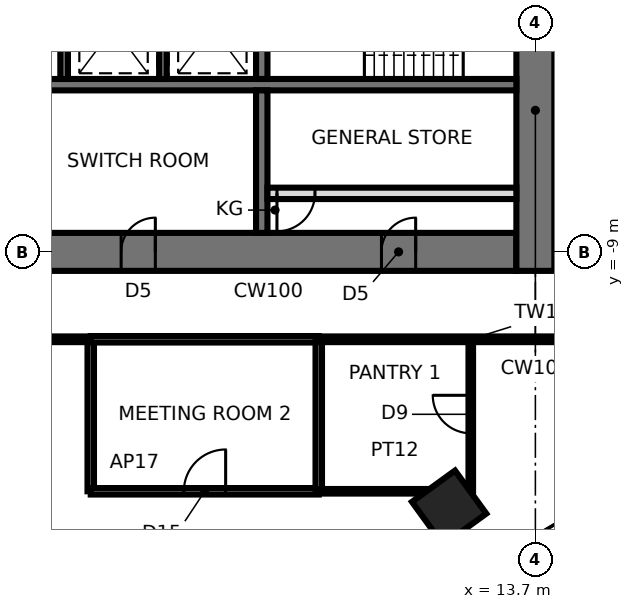
"""IFC4 building model, lengths in metres.
Left out: names, types, materials, properties, quantities, classifications, styles, units other than length and angle.
Written with IfcOpenShell. Run it as: python <this file> out.ifc"""

import sys

from ifc_helpers import new_model, si_unit, direction, frame, frame_2d, origin, origin_2d, place, context, subcontext, project, spatial, rectangle, extrude, element, fill, save


model = new_model("IFC4")
c1 = context("Model", 3, precision=1e-05, world=origin(), true_north=direction((0.0, 1.0)))
c2 = subcontext(c1, "Body", "Model", "MODEL_VIEW")
j1 = project(units=[si_unit("LENGTHUNIT", "METRE"), si_unit("PLANEANGLEUNIT", "RADIAN")], contexts=[c1])
p1 = place(None, origin())
s1 = spatial("IfcSite", under=j1, at=p1, CompositionType="ELEMENT")
p2 = place(p1, origin())
s2 = spatial("IfcBuilding", under=s1, at=p2, CompositionType="ELEMENT")
p3 = place(p2, frame((0.0, 0.0, 176.0)))
s3 = spatial("IfcBuildingStorey", under=s2, at=p3, CompositionType="ELEMENT", Elevation=176.0)
p4 = place(p3, frame((11.43, -15.733, 0.0), z_axis=(0.0, 0.0, 1.0), x_axis=(0.587785252292, -0.809016994375, 0.0)))
e1 = element("IfcColumn", 1, at=p4, inside=s3, PredefinedType="COLUMN", context=c2, shape_type="SweptSolid", body=[
    extrude(rectangle(XDim=1.4, YDim=1.4, at=origin_2d()), origin(), (0.0, 0.0, 1.0), 3.9),
])
p5 = place(p3, frame((-13.2, -9.0, 0.0), z_axis=(0.0, 0.0, 1.0), x_axis=(1.0, 0.0, 0.0)))
e2 = element("IfcWall", 2, at=p5, inside=s3, PredefinedType="SHEAR", context=c2, shape_type="SweptSolid", body=[
    extrude(rectangle(XDim=26.4, YDim=1.0, at=frame_2d((13.2, 0.0))), origin(), (0.0, 0.0, 1.0), 3.9),
])
p6 = place(p5, frame((2.65, 0.0, 0.0)))
e3 = element("IfcOpeningElement", 3, at=p6, cuts=e2, PredefinedType="OPENING", context=c2, shape_type="SweptSolid", body=[
    extrude(rectangle(XDim=0.9, YDim=2.1, at=frame_2d((0.45, 1.05))), frame((0.0, 0.51, 0.0), z_axis=(0.0, -1.0, 0.0), x_axis=(1.0, 0.0, 0.0)), (0.0, 0.0, 1.0), 1.02),
])
p7 = place(p5, frame((9.5, 0.0, 0.0)))
e4 = element("IfcOpeningElement", 4, at=p7, cuts=e2, PredefinedType="OPENING", context=c2, shape_type="SweptSolid", body=[
    extrude(rectangle(XDim=0.9, YDim=2.1, at=frame_2d((0.45, 1.05))), frame((0.0, 0.51, 0.0), z_axis=(0.0, -1.0, 0.0), x_axis=(1.0, 0.0, 0.0)), (0.0, 0.0, 1.0), 1.02),
])
p8 = place(p5, frame((16.0, 0.0, 0.0)))
e5 = element("IfcOpeningElement", 5, at=p8, cuts=e2, PredefinedType="OPENING", context=c2, shape_type="SweptSolid", body=[
    extrude(rectangle(XDim=0.9, YDim=2.1, at=frame_2d((0.45, 1.05))), frame((0.0, 0.51, 0.0), z_axis=(0.0, -1.0, 0.0), x_axis=(1.0, 0.0, 0.0)), (0.0, 0.0, 1.0), 1.02),
])
p9 = place(p5, frame((22.85, 0.0, 0.0)))
e6 = element("IfcOpeningElement", 6, at=p9, cuts=e2, PredefinedType="OPENING", context=c2, shape_type="SweptSolid", body=[
    extrude(rectangle(XDim=0.9, YDim=2.1, at=frame_2d((0.45, 1.05))), frame((0.0, 0.51, 0.0), z_axis=(0.0, -1.0, 0.0), x_axis=(1.0, 0.0, 0.0)), (0.0, 0.0, 1.0), 1.02),
])
p10 = place(p3, frame((13.7, -9.5, 0.0), z_axis=(0.0, 0.0, 1.0), x_axis=(0.0, 1.0, 0.0)))
e7 = element("IfcWall", 7, at=p10, inside=s3, PredefinedType="SHEAR", context=c2, shape_type="SweptSolid", body=[
    extrude(rectangle(XDim=19.0, YDim=1.0, at=frame_2d((9.5, 0.0))), origin(), (0.0, 0.0, 1.0), 3.9),
])
p11 = place(p10, frame((8.6, 0.0, 0.0)))
e8 = element("IfcOpeningElement", 8, at=p11, cuts=e7, PredefinedType="OPENING", context=c2, shape_type="SweptSolid", body=[
    extrude(rectangle(XDim=1.8, YDim=2.4, at=frame_2d((0.9, 1.2))), frame((0.0, 0.51, 0.0), z_axis=(0.0, -1.0, 0.0), x_axis=(1.0, 0.0, 0.0)), (0.0, 0.0, 1.0), 1.02),
])
p12 = place(p3, frame((-13.2, -4.6, 0.0), z_axis=(0.0, 0.0, 1.0), x_axis=(1.0, 0.0, 0.0)))
e9 = element("IfcWall", 9, at=p12, inside=s3, PredefinedType="SHEAR", context=c2, shape_type="SweptSolid", body=[
    extrude(rectangle(XDim=26.4, YDim=0.3, at=frame_2d((13.2, 0.0))), origin(), (0.0, 0.0, 1.0), 3.9),
])
p13 = place(p3, frame((6.5, -1.75, 0.0), z_axis=(0.0, 0.0, 1.0), x_axis=(0.0, -1.0, 0.0)))
e10 = element("IfcWall", 10, at=p13, inside=s3, PredefinedType="SHEAR", context=c2, shape_type="SweptSolid", body=[
    extrude(rectangle(XDim=2.7, YDim=0.3, at=frame_2d((1.35, 0.0))), origin(), (0.0, 0.0, 1.0), 3.9),
])
p14 = place(p3, frame((6.5, -4.75, 0.0), z_axis=(0.0, 0.0, 1.0), x_axis=(0.0, -1.0, 0.0)))
e11 = element("IfcWall", 11, at=p14, inside=s3, PredefinedType="SHEAR", context=c2, shape_type="SweptSolid", body=[
    extrude(rectangle(XDim=3.75, YDim=0.3, at=frame_2d((1.875, 0.0))), origin(), (0.0, 0.0, 1.0), 3.9),
])
for number, where, z_axis, x_axis in (
    (12, (1.3, -1.75, 0.0), (0.0, 0.0, 1.0), (0.0, -1.0, 0.0)),
    (13, (3.9, -1.75, 0.0), (0.0, 0.0, 1.0), (0.0, -1.0, 0.0)),
):
    element("IfcWall", number, at=place(p3, frame(where, z_axis=z_axis, x_axis=x_axis)), inside=s3, PredefinedType="SHEAR", context=c2, shape_type="SweptSolid", body=[
        extrude(rectangle(XDim=2.7, YDim=0.2, at=frame_2d((1.35, 0.0))), origin(), (0.0, 0.0, 1.0), 3.9),
    ])
p15 = place(p3, frame((6.65, -7.46, 0.0), z_axis=(0.0, 0.0, 1.0), x_axis=(1.0, 0.0, 0.0)))
e14 = element("IfcWall", 14, at=p15, inside=s3, PredefinedType="PARTITIONING", context=c2, shape_type="SweptSolid", body=[
    extrude(rectangle(XDim=6.55, YDim=0.3, at=frame_2d((3.275, 0.0))), origin(), (0.0, 0.0, 1.0), 3.74),
])
p16 = place(p15, frame((0.25, 0.0, 0.0)))
e15 = element("IfcOpeningElement", 15, at=p16, cuts=e14, PredefinedType="OPENING", context=c2, shape_type="SweptSolid", body=[
    extrude(rectangle(XDim=1.0, YDim=2.4, at=frame_2d((0.5, 1.2))), frame((0.0, 0.16, 0.0), z_axis=(0.0, -1.0, 0.0), x_axis=(1.0, 0.0, 0.0)), (0.0, 0.0, 1.0), 0.32),
])
p17 = place(p3, frame((-16.0, -11.3, 0.0), z_axis=(0.0, 0.0, 1.0), x_axis=(1.0, 0.0, 0.0)))
e16 = element("IfcWall", 16, at=p17, inside=s3, PredefinedType="PARTITIONING", context=c2, shape_type="SweptSolid", body=[
    extrude(rectangle(XDim=18.0, YDim=0.15, at=frame_2d((9.0, 0.0))), origin(), (0.0, 0.0, 1.0), 3.74),
])
p18 = place(p17, frame((4.113, 0.0, 0.0)))
e17 = element("IfcOpeningElement", 17, at=p18, cuts=e16, PredefinedType="OPENING", context=c2, shape_type="SweptSolid", body=[
    extrude(rectangle(XDim=1.2, YDim=2.4, at=frame_2d((0.6, 1.2))), frame((0.0, 0.085, 0.0), z_axis=(0.0, -1.0, 0.0), x_axis=(1.0, 0.0, 0.0)), (0.0, 0.0, 1.0), 0.17),
])
p19 = place(p3, frame((2.0, -11.3, 0.0), z_axis=(0.0, 0.0, 1.0), x_axis=(0.0, -1.0, 0.0)))
e18 = element("IfcWall", 18, at=p19, inside=s3, PredefinedType="PARTITIONING", context=c2, shape_type="SweptSolid", body=[
    extrude(rectangle(XDim=4.0, YDim=0.17, at=frame_2d((2.0, 0.0))), origin(), (0.0, 0.0, 1.0), 3.74),
])
p20 = place(p3, frame((2.0, -15.3, 0.0), z_axis=(0.0, 0.0, 1.0), x_axis=(1.0, 0.0, 0.0)))
e19 = element("IfcWall", 19, at=p20, inside=s3, PredefinedType="PARTITIONING", context=c2, shape_type="SweptSolid", body=[
    extrude(rectangle(XDim=6.0, YDim=0.17, at=frame_2d((3.0, 0.0))), origin(), (0.0, 0.0, 1.0), 3.334),
])
p21 = place(p20, frame((2.45, 0.0, 0.0)))
e20 = element("IfcOpeningElement", 20, at=p21, cuts=e19, PredefinedType="OPENING", context=c2, shape_type="SweptSolid", body=[
    extrude(rectangle(XDim=1.1, YDim=2.4, at=frame_2d((0.55, 1.2))), frame((0.0, 0.095, 0.0), z_axis=(0.0, -1.0, 0.0), x_axis=(1.0, 0.0, 0.0)), (0.0, 0.0, 1.0), 0.19),
])
p22 = place(p3, frame((8.0, -11.3, 0.0), z_axis=(0.0, 0.0, 1.0), x_axis=(-1.0, 0.0, 0.0)))
e21 = element("IfcWall", 21, at=p22, inside=s3, PredefinedType="PARTITIONING", context=c2, shape_type="SweptSolid", body=[
    extrude(rectangle(XDim=6.0, YDim=0.17, at=frame_2d((3.0, 0.0))), origin(), (0.0, 0.0, 1.0), 3.74),
])
p23 = place(p3, frame((8.0, -11.3, 0.0), z_axis=(0.0, 0.0, 1.0), x_axis=(0.0, -1.0, 0.0)))
e22 = element("IfcWall", 22, at=p23, inside=s3, PredefinedType="PARTITIONING", context=c2, shape_type="SweptSolid", body=[
    extrude(rectangle(XDim=4.0, YDim=0.17, at=frame_2d((2.0, 0.0))), origin(), (0.0, 0.0, 1.0), 3.74),
])
p24 = place(p3, frame((8.0, -15.3, 0.0), z_axis=(0.0, 0.0, 1.0), x_axis=(1.0, 0.0, 0.0)))
e23 = element("IfcWall", 23, at=p24, inside=s3, PredefinedType="PARTITIONING", context=c2, shape_type="SweptSolid", body=[
    extrude(rectangle(XDim=4.0, YDim=0.12, at=frame_2d((2.0, 0.0))), origin(), (0.0, 0.0, 1.0), 3.74),
])
p25 = place(p3, frame((12.0, -15.3, 0.0), z_axis=(0.0, 0.0, 1.0), x_axis=(0.0, 1.0, 0.0)))
e24 = element("IfcWall", 24, at=p25, inside=s3, PredefinedType="PARTITIONING", context=c2, shape_type="SweptSolid", body=[
    extrude(rectangle(XDim=4.0, YDim=0.12, at=frame_2d((2.0, 0.0))), origin(), (0.0, 0.0, 1.0), 3.74),
])
p26 = place(p25, frame((1.526, 0.0, 0.0)))
e25 = element("IfcOpeningElement", 25, at=p26, cuts=e24, PredefinedType="OPENING", context=c2, shape_type="SweptSolid", body=[
    extrude(rectangle(XDim=1.0, YDim=2.4, at=frame_2d((0.5, 1.2))), frame((0.0, 0.07, 0.0), z_axis=(0.0, -1.0, 0.0), x_axis=(1.0, 0.0, 0.0)), (0.0, 0.0, 1.0), 0.14),
])
p27 = place(p3, frame((8.0, -11.3, 0.0), z_axis=(0.0, 0.0, 1.0), x_axis=(1.0, 0.0, 0.0)))
e26 = element("IfcWall", 26, at=p27, inside=s3, PredefinedType="PARTITIONING", context=c2, shape_type="SweptSolid", body=[
    extrude(rectangle(XDim=8.0, YDim=0.15, at=frame_2d((4.0, 0.0))), origin(), (0.0, 0.0, 1.0), 3.74),
])
p28 = place(p8, origin())
e27 = element("IfcDoor", 27, at=p28, inside=s3, OperationType="SINGLE_SWING_RIGHT", PredefinedType="DOOR", context=c2, shape_type="SweptSolid", body=[
    extrude(rectangle(XDim=0.82, YDim=2.06, at=frame_2d((0.45, 1.03))), frame((0.0, 0.025, 0.0), z_axis=(0.0, -1.0, 0.0), x_axis=(1.0, 0.0, 0.0)), (0.0, 0.0, 1.0), 0.05),
    extrude(rectangle(XDim=0.04, YDim=2.1, at=frame_2d((0.02, 1.05))), frame((0.0, 0.25, 0.0), z_axis=(0.0, -1.0, 0.0), x_axis=(1.0, 0.0, 0.0)), (0.0, 0.0, 1.0), 0.5),
    extrude(rectangle(XDim=0.04, YDim=2.1, at=frame_2d((0.88, 1.05))), frame((0.0, 0.25, 0.0), z_axis=(0.0, -1.0, 0.0), x_axis=(1.0, 0.0, 0.0)), (0.0, 0.0, 1.0), 0.5),
    extrude(rectangle(XDim=0.82, YDim=0.04, at=frame_2d((0.45, 2.08))), frame((0.0, 0.25, 0.0), z_axis=(0.0, -1.0, 0.0), x_axis=(1.0, 0.0, 0.0)), (0.0, 0.0, 1.0), 0.5),
])
fill(e5, e27)
p29 = place(p9, origin())
e28 = element("IfcDoor", 28, at=p29, inside=s3, OperationType="SINGLE_SWING_RIGHT", PredefinedType="DOOR", context=c2, shape_type="SweptSolid", body=[
    extrude(rectangle(XDim=0.82, YDim=2.06, at=frame_2d((0.45, 1.03))), frame((0.0, 0.025, 0.0), z_axis=(0.0, -1.0, 0.0), x_axis=(1.0, 0.0, 0.0)), (0.0, 0.0, 1.0), 0.05),
    extrude(rectangle(XDim=0.04, YDim=2.1, at=frame_2d((0.02, 1.05))), frame((0.0, 0.25, 0.0), z_axis=(0.0, -1.0, 0.0), x_axis=(1.0, 0.0, 0.0)), (0.0, 0.0, 1.0), 0.5),
    extrude(rectangle(XDim=0.04, YDim=2.1, at=frame_2d((0.88, 1.05))), frame((0.0, 0.25, 0.0), z_axis=(0.0, -1.0, 0.0), x_axis=(1.0, 0.0, 0.0)), (0.0, 0.0, 1.0), 0.5),
    extrude(rectangle(XDim=0.82, YDim=0.04, at=frame_2d((0.45, 2.08))), frame((0.0, 0.25, 0.0), z_axis=(0.0, -1.0, 0.0), x_axis=(1.0, 0.0, 0.0)), (0.0, 0.0, 1.0), 0.5),
])
fill(e6, e28)
p30 = place(p16, frame((1.0, 0.0, 0.0), z_axis=(0.0, 0.0, 1.0), x_axis=(-1.0, 0.0, 0.0)))
e29 = element("IfcDoor", 29, at=p30, inside=s3, OperationType="SINGLE_SWING_RIGHT", PredefinedType="DOOR", context=c2, shape_type="SweptSolid", body=[
    extrude(rectangle(XDim=1.0, YDim=2.4, at=frame_2d((0.5, 1.2))), frame((0.0, 0.025, 0.0), z_axis=(0.0, -1.0, 0.0), x_axis=(1.0, 0.0, 0.0)), (0.0, 0.0, 1.0), 0.05),
])
fill(e15, e29)
p31 = place(p21, origin())
e30 = element("IfcDoor", 30, at=p31, inside=s3, OperationType="SINGLE_SWING_RIGHT", PredefinedType="DOOR", context=c2, shape_type="SweptSolid", body=[
    extrude(rectangle(XDim=1.1, YDim=2.4, at=frame_2d((0.55, 1.2))), frame((0.0, 0.025, 0.0), z_axis=(0.0, -1.0, 0.0), x_axis=(1.0, 0.0, 0.0)), (0.0, 0.0, 1.0), 0.05),
])
fill(e20, e30)
p32 = place(p26, origin())
e31 = element("IfcDoor", 31, at=p32, inside=s3, OperationType="SINGLE_SWING_RIGHT", PredefinedType="DOOR", context=c2, shape_type="SweptSolid", body=[
    extrude(rectangle(XDim=1.0, YDim=2.4, at=frame_2d((0.5, 1.2))), frame((0.0, 0.025, 0.0), z_axis=(0.0, -1.0, 0.0), x_axis=(1.0, 0.0, 0.0)), (0.0, 0.0, 1.0), 0.05),
])
fill(e25, e31)
save(model, sys.argv[1])
